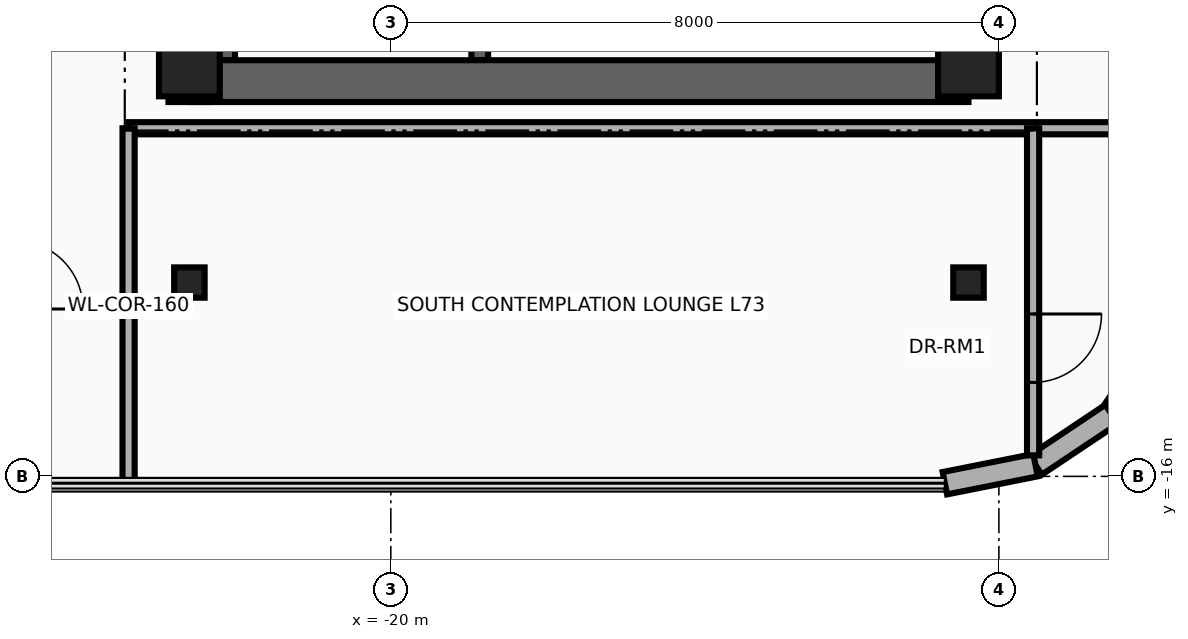
"""IFC4 building model, lengths in metres.
Left out: names, types, materials, properties, quantities, classifications, styles, units other than length and angle.
Written with IfcOpenShell. Run it as: python <this file> out.ifc"""

import sys

from ifc_helpers import new_model, si_unit, direction, frame, frame_2d, origin, origin_2d, place, context, subcontext, project, spatial, rectangle, i_section, extrude, source, transform, mapped, element, fill, save


model = new_model("IFC4")
c1 = context("Model", 3, precision=1e-05, world=origin(), true_north=direction((0.0, 1.0)))
c2 = subcontext(c1, "Body", "Model", "MODEL_VIEW")
j1 = project(units=[si_unit("LENGTHUNIT", "METRE"), si_unit("PLANEANGLEUNIT", "RADIAN")], contexts=[c1])
p1 = place(None, origin())
s1 = spatial("IfcSite", under=j1, at=p1, CompositionType="ELEMENT")
p2 = place(p1, origin())
s2 = spatial("IfcBuilding", under=s1, at=p2, CompositionType="ELEMENT")
p3 = place(p2, frame((0.0, 0.0, 280.0)))
s3 = spatial("IfcBuildingStorey", under=s2, at=p3, CompositionType="ELEMENT", Elevation=280.0)
for number, where, z_axis, x_axis in (
    (1, (-22.16, -10.525, 0.0), (0.0, 0.0, 1.0), (0.0, 1.0, 0.0)),
    (2, (-18.83, -10.525, 0.0), (0.0, 0.0, 1.0), (0.0, 1.0, 0.0)),
):
    element("IfcWall", number, at=place(p3, frame(where, z_axis=z_axis, x_axis=x_axis)), inside=s3, PredefinedType="SHEAR", context=c2, shape_type="SweptSolid", body=[
        extrude(rectangle(XDim=8.745, YDim=0.22, at=frame_2d((4.373, 0.0))), origin(), (0.0, 0.0, 1.0), 3.26),
    ])
p4 = place(p3, frame((-22.65, -11.075, 0.0), z_axis=(0.0, 0.0, 1.0), x_axis=(0.0, 1.0, 0.0)))
e3 = element("IfcWall", 3, at=p4, inside=s3, PredefinedType="SHEAR", context=c2, shape_type="SweptSolid", body=[
    extrude(rectangle(XDim=22.15, YDim=0.55, at=frame_2d((11.075, 0.0))), origin(), (0.0, 0.0, 1.0), 3.26),
])
p5 = place(p3, frame((-22.65, -10.8, 0.0), z_axis=(0.0, 0.0, 1.0), x_axis=(1.0, 0.0, 0.0)))
e4 = element("IfcWall", 4, at=p5, inside=s3, PredefinedType="SHEAR", context=c2, shape_type="SweptSolid", body=[
    extrude(rectangle(XDim=10.25, YDim=0.55, at=frame_2d((5.125, 0.0))), origin(), (0.0, 0.0, 1.0), 3.26),
])
m1 = source(origin(), c2, "Body", "SweptSolid", [
    extrude(rectangle(XDim=0.8, YDim=0.8, at=origin_2d()), origin(), (0.0, 0.0, 1.0), 3.5),
])
for number, where, z_axis, x_axis in (
    (5, (-22.65, -10.6, 0.0), (0.0, 0.0, 1.0), (1.0, 0.0, 0.0)),
    (6, (-12.4, -10.6, 0.0), (0.0, 0.0, 1.0), (1.0, 0.0, 0.0)),
):
    element("IfcColumn", number, at=place(p3, frame(where, z_axis=z_axis, x_axis=x_axis)), inside=s3, PredefinedType="COLUMN", context=c2, shape_type="MappedRepresentation", body=[
        mapped(m1, transform((0.0, 0.0, 0.0), x_axis=(1.0, 0.0, 0.0), y_axis=(0.0, 1.0, 0.0), z_axis=(0.0, 0.0, 1.0), scale=1.0)),
    ])
m2 = source(origin(), c2, "Body", "SweptSolid", [
    extrude(i_section(OverallWidth=0.401, OverallDepth=0.399, WebThickness=0.025, FlangeThickness=0.04, at=origin_2d()), origin(), (0.0, 0.0, 1.0), 3.5),
])
for number, where, z_axis, x_axis in (
    (7, (-22.65, -13.45, 0.0), (0.0, 0.0, 1.0), (1.0, 0.0, 0.0)),
    (8, (-12.4, -13.45, 0.0), (0.0, 0.0, 1.0), (1.0, 0.0, 0.0)),
):
    element("IfcColumn", number, at=place(p3, frame(where, z_axis=z_axis, x_axis=x_axis)), inside=s3, PredefinedType="COLUMN", context=c2, shape_type="MappedRepresentation", body=[
        mapped(m2, transform((0.0, 0.0, 0.0), x_axis=(1.0, 0.0, 0.0), y_axis=(0.0, 1.0, 0.0), z_axis=(0.0, 0.0, 1.0), scale=1.0)),
    ])
for number, where, z_axis, x_axis in (
    (9, (-9.847, -14.182, 0.0), (0.0, 0.0, 1.0), (-0.556, -0.831, 0.0)),
    (10, (-10.517, -15.183, 0.0), (0.0, 0.0, 1.0), (-0.831, -0.556, 0.0)),
):
    element("IfcWall", number, at=place(p3, frame(where, z_axis=z_axis, x_axis=x_axis)), inside=s3, PredefinedType="SOLIDWALL", context=c2, shape_type="SweptSolid", body=[
        extrude(rectangle(XDim=1.205, YDim=0.3, at=frame_2d((0.603, 0.0))), origin(), (0.0, 0.0, 1.0), 3.26),
    ])
p6 = place(p3, frame((-11.518, -15.853, 0.0), z_axis=(0.0, 0.0, 1.0), x_axis=(-0.980765602568, -0.195189223115, 0.0)))
e11 = element("IfcWall", 11, at=p6, inside=s3, PredefinedType="SOLIDWALL", context=c2, shape_type="SweptSolid", body=[
    extrude(rectangle(XDim=1.216, YDim=0.3, at=frame_2d((0.608, 0.0))), origin(), (0.0, 0.0, 1.0), 3.26),
])
p7 = place(p3, frame((-23.45, -11.42, 0.0), z_axis=(0.0, 0.0, 1.0), x_axis=(1.0, 0.0, 0.0)))
e12 = element("IfcWall", 12, at=p7, inside=s3, PredefinedType="PARTITIONING", context=c2, shape_type="SweptSolid", body=[
    extrude(rectangle(XDim=13.84, YDim=0.16, at=frame_2d((6.92, 0.0))), origin(), (0.0, 0.0, 1.0), 2.634),
])
p8 = place(p3, frame((-23.45, -16.09, 0.0), z_axis=(0.0, 0.0, 1.0), x_axis=(0.0, 1.0, 0.0)))
e13 = element("IfcWall", 13, at=p8, inside=s3, PredefinedType="PARTITIONING", context=c2, shape_type="SweptSolid", body=[
    extrude(rectangle(XDim=4.67, YDim=0.16, at=frame_2d((2.335, 0.0))), origin(), (0.0, 0.0, 1.0), 3.26),
])
p9 = place(p3, frame((-11.55, -15.724, 0.0), z_axis=(0.0, 0.0, 1.0), x_axis=(0.0, 1.0, 0.0)))
e14 = element("IfcWall", 14, at=p9, inside=s3, PredefinedType="PARTITIONING", context=c2, shape_type="SweptSolid", body=[
    extrude(rectangle(XDim=4.304, YDim=0.16, at=frame_2d((2.152, 0.0))), origin(), (0.0, 0.0, 1.0), 3.26),
])
p10 = place(p9, frame((0.96, 0.0, 0.0)))
e15 = element("IfcOpeningElement", 15, at=p10, cuts=e14, PredefinedType="OPENING", context=c2, shape_type="SweptSolid", body=[
    extrude(rectangle(XDim=0.9, YDim=2.1, at=frame_2d((0.45, 1.05))), frame((0.0, 0.095, 0.0), z_axis=(0.0, -1.0, 0.0), x_axis=(1.0, 0.0, 0.0)), (0.0, 0.0, 1.0), 0.19),
])
p11 = place(p10, frame((0.9, 0.0, 0.0), z_axis=(0.0, 0.0, 1.0), x_axis=(-1.0, 0.0, 0.0)))
e16 = element("IfcDoor", 16, at=p11, inside=s3, OperationType="SINGLE_SWING_LEFT", PredefinedType="DOOR", context=c2, shape_type="SweptSolid", body=[
    extrude(rectangle(XDim=0.9, YDim=2.1, at=frame_2d((0.45, 1.05))), frame((0.0, 0.025, 0.0), z_axis=(0.0, -1.0, 0.0), x_axis=(1.0, 0.0, 0.0)), (0.0, 0.0, 1.0), 0.05),
])
fill(e15, e16)
save(model, sys.argv[1])
